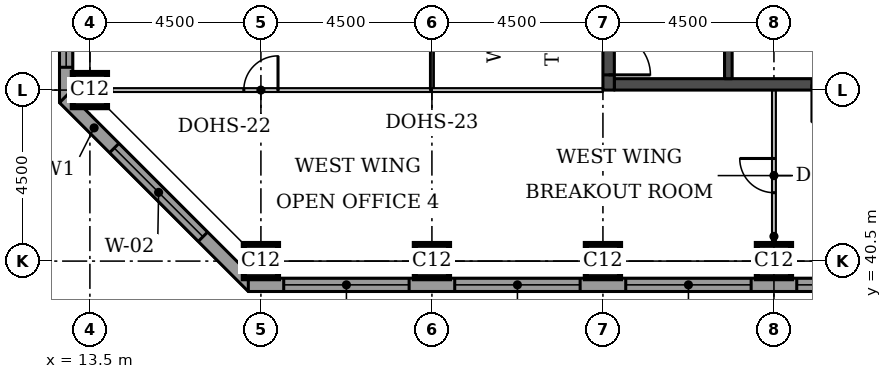
"""IFC4 building model, lengths in metres.
Left out: names, types, materials, properties, quantities, classifications, styles, units other than length and angle.
Written with IfcOpenShell. Run it as: python <this file> out.ifc"""

import sys

from ifc_helpers import new_model, si_unit, direction, frame, frame_2d, origin, origin_2d, place, context, subcontext, project, spatial, rectangle, extrude, element, fill, save


model = new_model("IFC4")
c1 = context("Model", 3, precision=1e-05, world=origin(), true_north=direction((0.0, 1.0)))
c2 = subcontext(c1, "Body", "Model", "MODEL_VIEW")
j1 = project(units=[si_unit("LENGTHUNIT", "METRE"), si_unit("PLANEANGLEUNIT", "RADIAN")], contexts=[c1])
p1 = place(None, origin())
s1 = spatial("IfcSite", under=j1, at=p1, CompositionType="ELEMENT")
p2 = place(p1, origin())
s2 = spatial("IfcBuilding", under=s1, at=p2, CompositionType="ELEMENT")
p3 = place(p2, frame((0.0, 0.0, 260.0)))
s3 = spatial("IfcBuildingStorey", under=s2, at=p3, CompositionType="ELEMENT", Elevation=260.0)
for number, where, z_axis, x_axis in (
    (1, (18.0, 40.5, 0.0), (0.0, 0.0, 1.0), (1.0, 0.0, 0.0)),
    (2, (22.5, 40.5, 0.0), (0.0, 0.0, 1.0), (1.0, 0.0, 0.0)),
    (3, (27.0, 40.5, 0.0), (0.0, 0.0, 1.0), (1.0, 0.0, 0.0)),
    (4, (31.5, 40.5, 0.0), (0.0, 0.0, 1.0), (1.0, 0.0, 0.0)),
    (5, (13.5, 45.0, 0.0), (0.0, 0.0, 1.0), (1.0, 0.0, 0.0)),
):
    element("IfcColumn", number, at=place(p3, frame(where, z_axis=z_axis, x_axis=x_axis)), inside=s3, PredefinedType="COLUMN", context=c2, shape_type="SweptSolid", body=[
        extrude(rectangle(XDim=0.9, YDim=0.9, at=origin_2d()), origin(), (0.0, 0.0, 1.0), 3.7),
    ])
p4 = place(p3, frame((27.3, 45.15, 0.0), z_axis=(0.0, 0.0, 1.0), x_axis=(1.0, 0.0, 0.0)))
e6 = element("IfcWall", 6, at=p4, inside=s3, PredefinedType="SHEAR", context=c2, shape_type="SweptSolid", body=[
    extrude(rectangle(XDim=8.4, YDim=0.3, at=frame_2d((4.2, 0.0))), origin(), (0.0, 0.0, 1.0), 3.7),
])
p5 = place(p4, frame((5.2, 0.0, 0.0)))
e7 = element("IfcOpeningElement", 7, at=p5, cuts=e6, PredefinedType="OPENING", context=c2, shape_type="SweptSolid", body=[
    extrude(rectangle(XDim=1.0, YDim=2.1, at=frame_2d((0.5, 1.05))), frame((0.0, 0.16, 0.0), z_axis=(0.0, -1.0, 0.0), x_axis=(1.0, 0.0, 0.0)), (0.0, 0.0, 1.0), 0.32),
])
p6 = place(p3, frame((27.15, 45.0, 0.0), z_axis=(0.0, 0.0, 1.0), x_axis=(0.0, 1.0, 0.0)))
e8 = element("IfcWall", 8, at=p6, inside=s3, PredefinedType="SHEAR", context=c2, shape_type="SweptSolid", body=[
    extrude(rectangle(XDim=9.0, YDim=0.3, at=frame_2d((4.5, 0.0))), origin(), (0.0, 0.0, 1.0), 3.7),
])
p7 = place(p6, frame((0.4, 0.0, 0.0)))
e9 = element("IfcOpeningElement", 9, at=p7, cuts=e8, PredefinedType="OPENING", context=c2, shape_type="SweptSolid", body=[
    extrude(rectangle(XDim=1.1, YDim=2.1, at=frame_2d((0.55, 1.05))), frame((0.0, 0.16, 0.0), z_axis=(0.0, -1.0, 0.0), x_axis=(1.0, 0.0, 0.0)), (0.0, 0.0, 1.0), 0.32),
])
p8 = place(p3, frame((12.875, 58.831, 0.0), z_axis=(0.0, 0.0, 1.0), x_axis=(0.0, -1.0, 0.0)))
e10 = element("IfcWall", 10, at=p8, inside=s3, PredefinedType="STANDARD", context=c2, shape_type="SweptSolid", body=[
    extrude(rectangle(XDim=14.163, YDim=0.35, at=frame_2d((7.081, 0.0))), origin(), (0.0, 0.0, 1.0), 3.375),
])
p9 = place(p8, frame((0.931, 0.0, 0.9)))
e11 = element("IfcOpeningElement", 11, at=p9, cuts=e10, PredefinedType="OPENING", context=c2, shape_type="SweptSolid", body=[
    extrude(rectangle(XDim=3.3, YDim=1.9, at=frame_2d((1.65, 0.95))), frame((0.0, 0.185, 0.0), z_axis=(0.0, -1.0, 0.0), x_axis=(1.0, 0.0, 0.0)), (0.0, 0.0, 1.0), 0.37),
])
p10 = place(p8, frame((5.431, 0.0, 0.9)))
e12 = element("IfcOpeningElement", 12, at=p10, cuts=e10, PredefinedType="OPENING", context=c2, shape_type="SweptSolid", body=[
    extrude(rectangle(XDim=3.3, YDim=1.9, at=frame_2d((1.65, 0.95))), frame((0.0, 0.185, 0.0), z_axis=(0.0, -1.0, 0.0), x_axis=(1.0, 0.0, 0.0)), (0.0, 0.0, 1.0), 0.37),
])
p11 = place(p8, frame((9.931, 0.0, 0.9)))
e13 = element("IfcOpeningElement", 13, at=p11, cuts=e10, PredefinedType="OPENING", context=c2, shape_type="SweptSolid", body=[
    extrude(rectangle(XDim=3.3, YDim=1.9, at=frame_2d((1.65, 0.95))), frame((0.0, 0.185, 0.0), z_axis=(0.0, -1.0, 0.0), x_axis=(1.0, 0.0, 0.0)), (0.0, 0.0, 1.0), 0.37),
])
p12 = place(p3, frame((12.824, 44.792, 0.0), z_axis=(0.0, 0.0, 1.0), x_axis=(0.707106781187, -0.707106781187, 0.0)))
e14 = element("IfcWall", 14, at=p12, inside=s3, PredefinedType="STANDARD", context=c2, shape_type="SweptSolid", body=[
    extrude(rectangle(XDim=7.027, YDim=0.35, at=frame_2d((3.513, 0.0))), origin(), (0.0, 0.0, 1.0), 3.375),
])
p13 = place(p12, frame((1.863, 0.0, 0.9)))
e15 = element("IfcOpeningElement", 15, at=p13, cuts=e14, PredefinedType="OPENING", context=c2, shape_type="SweptSolid", body=[
    extrude(rectangle(XDim=3.3, YDim=1.9, at=frame_2d((1.65, 0.95))), frame((0.0, 0.185, 0.0), z_axis=(0.0, -1.0, 0.0), x_axis=(1.0, 0.0, 0.0)), (0.0, 0.0, 1.0), 0.37),
])
p14 = place(p3, frame((17.669, 39.875, 0.0), z_axis=(0.0, 0.0, 1.0), x_axis=(1.0, 0.0, 0.0)))
e16 = element("IfcWall", 16, at=p14, inside=s3, PredefinedType="STANDARD", context=c2, shape_type="SweptSolid", body=[
    extrude(rectangle(XDim=18.331, YDim=0.35, at=frame_2d((9.166, 0.0))), origin(), (0.0, 0.0, 1.0), 3.375),
])
p15 = place(p14, frame((0.931, 0.0, 0.9)))
e17 = element("IfcOpeningElement", 17, at=p15, cuts=e16, PredefinedType="OPENING", context=c2, shape_type="SweptSolid", body=[
    extrude(rectangle(XDim=3.3, YDim=1.9, at=frame_2d((1.65, 0.95))), frame((0.0, 0.185, 0.0), z_axis=(0.0, -1.0, 0.0), x_axis=(1.0, 0.0, 0.0)), (0.0, 0.0, 1.0), 0.37),
])
p16 = place(p14, frame((5.431, 0.0, 0.9)))
e18 = element("IfcOpeningElement", 18, at=p16, cuts=e16, PredefinedType="OPENING", context=c2, shape_type="SweptSolid", body=[
    extrude(rectangle(XDim=3.3, YDim=1.9, at=frame_2d((1.65, 0.95))), frame((0.0, 0.185, 0.0), z_axis=(0.0, -1.0, 0.0), x_axis=(1.0, 0.0, 0.0)), (0.0, 0.0, 1.0), 0.37),
])
p17 = place(p14, frame((9.931, 0.0, 0.9)))
e19 = element("IfcOpeningElement", 19, at=p17, cuts=e16, PredefinedType="OPENING", context=c2, shape_type="SweptSolid", body=[
    extrude(rectangle(XDim=3.3, YDim=1.9, at=frame_2d((1.65, 0.95))), frame((0.0, 0.185, 0.0), z_axis=(0.0, -1.0, 0.0), x_axis=(1.0, 0.0, 0.0)), (0.0, 0.0, 1.0), 0.37),
])
p18 = place(p14, frame((14.431, 0.0, 0.9)))
e20 = element("IfcOpeningElement", 20, at=p18, cuts=e16, PredefinedType="OPENING", context=c2, shape_type="SweptSolid", body=[
    extrude(rectangle(XDim=3.3, YDim=1.9, at=frame_2d((1.65, 0.95))), frame((0.0, 0.185, 0.0), z_axis=(0.0, -1.0, 0.0), x_axis=(1.0, 0.0, 0.0)), (0.0, 0.0, 1.0), 0.37),
])
p19 = place(p3, frame((22.5, 45.0, 0.0), z_axis=(0.0, 0.0, 1.0), x_axis=(-1.0, 0.0, 0.0)))
e21 = element("IfcWall", 21, at=p19, inside=s3, PredefinedType="PARTITIONING", context=c2, shape_type="SweptSolid", body=[
    extrude(rectangle(XDim=9.0, YDim=0.1, at=frame_2d((4.5, 0.0))), origin(), (0.0, 0.0, 1.0), 2.4),
])
p20 = place(p19, frame((4.05, 0.0, 0.0)))
e22 = element("IfcOpeningElement", 22, at=p20, cuts=e21, PredefinedType="OPENING", context=c2, shape_type="SweptSolid", body=[
    extrude(rectangle(XDim=0.9, YDim=2.1, at=frame_2d((0.45, 1.05))), frame((0.0, 0.06, 0.0), z_axis=(0.0, -1.0, 0.0), x_axis=(1.0, 0.0, 0.0)), (0.0, 0.0, 1.0), 0.12),
])
p21 = place(p3, frame((22.5, 49.5, 0.0), z_axis=(0.0, 0.0, 1.0), x_axis=(0.0, -1.0, 0.0)))
e23 = element("IfcWall", 23, at=p21, inside=s3, PredefinedType="PARTITIONING", context=c2, shape_type="SweptSolid", body=[
    extrude(rectangle(XDim=4.5, YDim=0.1, at=frame_2d((2.25, 0.0))), origin(), (0.0, 0.0, 1.0), 3.45),
])
p22 = place(p21, frame((1.8, 0.0, 0.0)))
e24 = element("IfcOpeningElement", 24, at=p22, cuts=e23, PredefinedType="OPENING", context=c2, shape_type="SweptSolid", body=[
    extrude(rectangle(XDim=0.9, YDim=2.1, at=frame_2d((0.45, 1.05))), frame((0.0, 0.06, 0.0), z_axis=(0.0, -1.0, 0.0), x_axis=(1.0, 0.0, 0.0)), (0.0, 0.0, 1.0), 0.12),
])
p23 = place(p3, frame((22.5, 45.0, 0.0), z_axis=(0.0, 0.0, 1.0), x_axis=(1.0, 0.0, 0.0)))
e25 = element("IfcWall", 25, at=p23, inside=s3, PredefinedType="PARTITIONING", context=c2, shape_type="SweptSolid", body=[
    extrude(rectangle(XDim=4.5, YDim=0.1, at=frame_2d((2.25, 0.0))), origin(), (0.0, 0.0, 1.0), 2.4),
])
p24 = place(p3, frame((31.5, 45.0, 0.0), z_axis=(0.0, 0.0, 1.0), x_axis=(0.0, -1.0, 0.0)))
e26 = element("IfcWall", 26, at=p24, inside=s3, PredefinedType="PARTITIONING", context=c2, shape_type="SweptSolid", body=[
    extrude(rectangle(XDim=4.5, YDim=0.1, at=frame_2d((2.25, 0.0))), origin(), (0.0, 0.0, 1.0), 3.45),
])
p25 = place(p24, frame((1.8, 0.0, 0.0)))
e27 = element("IfcOpeningElement", 27, at=p25, cuts=e26, PredefinedType="OPENING", context=c2, shape_type="SweptSolid", body=[
    extrude(rectangle(XDim=0.9, YDim=2.1, at=frame_2d((0.45, 1.05))), frame((0.0, 0.06, 0.0), z_axis=(0.0, -1.0, 0.0), x_axis=(1.0, 0.0, 0.0)), (0.0, 0.0, 1.0), 0.12),
])
p26 = place(p3, frame((30.3, 45.3, 0.0), z_axis=(0.0, 0.0, 1.0), x_axis=(0.0, 1.0, 0.0)))
e28 = element("IfcWall", 28, at=p26, inside=s3, PredefinedType="SOLIDWALL", context=c2, shape_type="SweptSolid", body=[
    extrude(rectangle(XDim=5.7, YDim=0.2, at=frame_2d((2.85, 0.0))), origin(), (0.0, 0.0, 1.0), 3.45),
])
p27 = place(p11, origin())
e29 = element("IfcWindow", 29, at=p27, inside=s3, PartitioningType="SINGLE_PANEL", PredefinedType="WINDOW", context=c2, shape_type="SweptSolid", body=[
    extrude(rectangle(XDim=3.3, YDim=1.9, at=frame_2d((1.65, 0.95))), frame((0.0, 0.085, 0.0), z_axis=(0.0, -1.0, 0.0), x_axis=(1.0, 0.0, 0.0)), (0.0, 0.0, 1.0), 0.06),
])
fill(e13, e29)
p28 = place(p13, origin())
e30 = element("IfcWindow", 30, at=p28, inside=s3, PartitioningType="SINGLE_PANEL", PredefinedType="WINDOW", context=c2, shape_type="SweptSolid", body=[
    extrude(rectangle(XDim=3.3, YDim=1.9, at=frame_2d((1.65, 0.95))), frame((0.0, 0.085, 0.0), z_axis=(0.0, -1.0, 0.0), x_axis=(1.0, 0.0, 0.0)), (0.0, 0.0, 1.0), 0.06),
])
fill(e15, e30)
p29 = place(p15, origin())
e31 = element("IfcWindow", 31, at=p29, inside=s3, PartitioningType="SINGLE_PANEL", PredefinedType="WINDOW", context=c2, shape_type="SweptSolid", body=[
    extrude(rectangle(XDim=3.3, YDim=1.9, at=frame_2d((1.65, 0.95))), frame((0.0, 0.085, 0.0), z_axis=(0.0, -1.0, 0.0), x_axis=(1.0, 0.0, 0.0)), (0.0, 0.0, 1.0), 0.06),
])
fill(e17, e31)
p30 = place(p16, origin())
e32 = element("IfcWindow", 32, at=p30, inside=s3, PartitioningType="SINGLE_PANEL", PredefinedType="WINDOW", context=c2, shape_type="SweptSolid", body=[
    extrude(rectangle(XDim=3.3, YDim=1.9, at=frame_2d((1.65, 0.95))), frame((0.0, 0.085, 0.0), z_axis=(0.0, -1.0, 0.0), x_axis=(1.0, 0.0, 0.0)), (0.0, 0.0, 1.0), 0.06),
])
fill(e18, e32)
p31 = place(p17, origin())
e33 = element("IfcWindow", 33, at=p31, inside=s3, PartitioningType="SINGLE_PANEL", PredefinedType="WINDOW", context=c2, shape_type="SweptSolid", body=[
    extrude(rectangle(XDim=3.3, YDim=1.9, at=frame_2d((1.65, 0.95))), frame((0.0, 0.085, 0.0), z_axis=(0.0, -1.0, 0.0), x_axis=(1.0, 0.0, 0.0)), (0.0, 0.0, 1.0), 0.06),
])
fill(e19, e33)
p32 = place(p18, origin())
e34 = element("IfcWindow", 34, at=p32, inside=s3, PartitioningType="SINGLE_PANEL", PredefinedType="WINDOW", context=c2, shape_type="SweptSolid", body=[
    extrude(rectangle(XDim=3.3, YDim=1.9, at=frame_2d((1.65, 0.95))), frame((0.0, 0.085, 0.0), z_axis=(0.0, -1.0, 0.0), x_axis=(1.0, 0.0, 0.0)), (0.0, 0.0, 1.0), 0.06),
])
fill(e20, e34)
p33 = place(p20, frame((0.9, 0.0, 0.0), z_axis=(0.0, 0.0, 1.0), x_axis=(-1.0, 0.0, 0.0)))
e35 = element("IfcDoor", 35, at=p33, inside=s3, OperationType="SINGLE_SWING_RIGHT", PredefinedType="DOOR", context=c2, shape_type="SweptSolid", body=[
    extrude(rectangle(XDim=0.9, YDim=2.1, at=frame_2d((0.45, 1.05))), frame((0.0, 0.025, 0.0), z_axis=(0.0, -1.0, 0.0), x_axis=(1.0, 0.0, 0.0)), (0.0, 0.0, 1.0), 0.05),
])
fill(e22, e35)
p34 = place(p25, frame((0.9, 0.0, 0.0), z_axis=(0.0, 0.0, 1.0), x_axis=(-1.0, 0.0, 0.0)))
e36 = element("IfcDoor", 36, at=p34, inside=s3, OperationType="SINGLE_SWING_RIGHT", PredefinedType="DOOR", context=c2, shape_type="SweptSolid", body=[
    extrude(rectangle(XDim=0.9, YDim=2.1, at=frame_2d((0.45, 1.05))), frame((0.0, 0.025, 0.0), z_axis=(0.0, -1.0, 0.0), x_axis=(1.0, 0.0, 0.0)), (0.0, 0.0, 1.0), 0.05),
])
fill(e27, e36)
p35 = place(p7, frame((1.1, 0.0, 0.0), z_axis=(0.0, 0.0, 1.0), x_axis=(-1.0, 0.0, 0.0)))
e37 = element("IfcDoor", 37, at=p35, inside=s3, OperationType="SINGLE_SWING_RIGHT", PredefinedType="DOOR", context=c2, shape_type="SweptSolid", body=[
    extrude(rectangle(XDim=1.1, YDim=2.1, at=frame_2d((0.55, 1.05))), frame((0.0, 0.025, 0.0), z_axis=(0.0, -1.0, 0.0), x_axis=(1.0, 0.0, 0.0)), (0.0, 0.0, 1.0), 0.05),
])
fill(e9, e37)
save(model, sys.argv[1])
